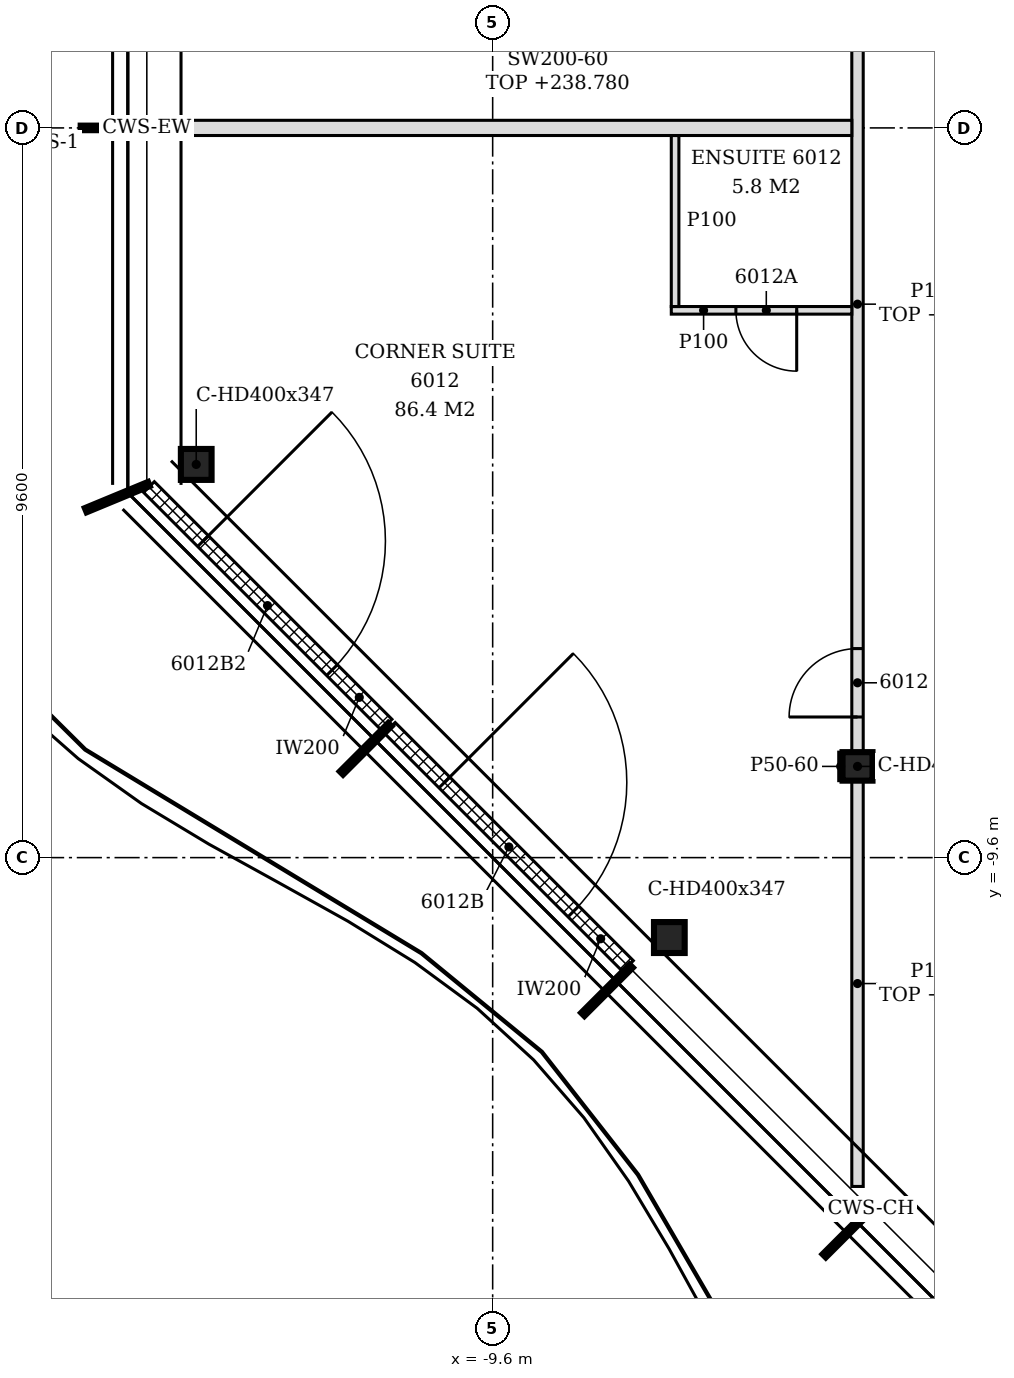
"""IFC4 building model, lengths in metres.
Left out: names, types, materials, properties, quantities, classifications, styles, units other than length and angle.
Written with IfcOpenShell. Run it as: python <this file> out.ifc"""

import sys

from ifc_helpers import new_model, si_unit, direction, frame, frame_2d, origin, origin_2d, place, context, subcontext, project, spatial, polyline, rectangle, i_section, outline, extrude, element, fill, save


model = new_model("IFC4")
c1 = context("Model", 3, precision=1e-05, world=origin(), true_north=direction((0.0, 1.0)))
c2 = subcontext(c1, "Body", "Model", "MODEL_VIEW")
j1 = project(units=[si_unit("LENGTHUNIT", "METRE"), si_unit("PLANEANGLEUNIT", "RADIAN")], contexts=[c1])
p1 = place(None, origin())
s1 = spatial("IfcSite", under=j1, at=p1, CompositionType="ELEMENT")
p2 = place(p1, origin())
s2 = spatial("IfcBuilding", under=s1, at=p2, CompositionType="ELEMENT")
p3 = place(p2, frame((0.0, 0.0, 235.8)))
s3 = spatial("IfcBuildingStorey", under=s2, at=p3, CompositionType="ELEMENT", Elevation=235.8)
for number, where, z_axis, x_axis in (
    (1, (-13.5, -4.427, -0.15), (0.0, 0.0, 1.0), (1.0, 0.0, 0.0)),
    (2, (-7.276, -10.652, -0.15), (0.0, 0.0, 1.0), (1.0, 0.0, 0.0)),
):
    element("IfcColumn", number, at=place(p3, frame(where, z_axis=z_axis, x_axis=x_axis)), inside=s3, PredefinedType="COLUMN", context=c2, shape_type="SweptSolid", body=[
        extrude(i_section(OverallWidth=0.404, OverallDepth=0.407, WebThickness=0.027, FlangeThickness=0.044, FilletRadius=0.015, at=origin_2d()), origin(), (0.0, 0.0, 1.0), 3.6),
    ])
p4 = place(p3, frame((-4.8, -8.4, -0.15), z_axis=(0.0, 0.0, 1.0), x_axis=(1.0, 0.0, 0.0)))
e3 = element("IfcColumn", 3, at=p4, inside=s3, PredefinedType="COLUMN", context=c2, shape_type="SweptSolid", body=[
    extrude(i_section(OverallWidth=0.394, OverallDepth=0.375, WebThickness=0.017, FlangeThickness=0.028, FilletRadius=0.015, at=origin_2d()), origin(), (0.0, 0.0, 1.0), 3.6),
])
p5 = place(p3, frame((-14.122, -4.725, 0.0), z_axis=(0.0, 0.0, 1.0), x_axis=(0.707106781187, -0.707106781187, 0.0)))
e4 = element("IfcWall", 4, at=p5, inside=s3, PredefinedType="NOTDEFINED", context=c2, shape_type="SweptSolid", body=[
    extrude(rectangle(XDim=4.421, YDim=0.2, at=frame_2d((2.21, 0.0))), origin(), (0.0, 0.0, 1.0), 3.45),
])
p6 = place(p5, frame((1.005, 0.0, 0.0)))
e5 = element("IfcOpeningElement", 5, at=p6, cuts=e4, PredefinedType="OPENING", context=c2, shape_type="SweptSolid", body=[
    extrude(rectangle(XDim=2.4, YDim=2.4, at=frame_2d((1.2, 1.2))), frame((0.0, 0.11, 0.0), z_axis=(0.0, -1.0, 0.0), x_axis=(1.0, 0.0, 0.0)), (0.0, 0.0, 1.0), 0.22),
])
p7 = place(p3, frame((-10.953, -7.893, 0.0), z_axis=(0.0, 0.0, 1.0), x_axis=(0.707106781187, -0.707106781187, 0.0)))
e6 = element("IfcWall", 6, at=p7, inside=s3, PredefinedType="NOTDEFINED", context=c2, shape_type="SweptSolid", body=[
    extrude(rectangle(XDim=4.431, YDim=0.2, at=frame_2d((2.215, 0.0))), origin(), (0.0, 0.0, 1.0), 3.45),
])
p8 = place(p7, frame((1.015, 0.0, 0.0)))
e7 = element("IfcOpeningElement", 7, at=p8, cuts=e6, PredefinedType="OPENING", context=c2, shape_type="SweptSolid", body=[
    extrude(rectangle(XDim=2.4, YDim=2.4, at=frame_2d((1.2, 1.2))), frame((0.0, 0.11, 0.0), z_axis=(0.0, -1.0, 0.0), x_axis=(1.0, 0.0, 0.0)), (0.0, 0.0, 1.0), 0.22),
])
p9 = place(p3, frame((-4.8, -13.926, 0.0), z_axis=(0.0, 0.0, 1.0), x_axis=(0.0, 1.0, 0.0)))
e8 = element("IfcWall", 8, at=p9, inside=s3, PredefinedType="PARTITIONING", context=c2, shape_type="SweptSolid", body=[
    extrude(outline(polyline([(0.0, 0.0), (5.339, 0.0), (5.339, 3.03), (1.369, 3.03), (1.367, 2.63), (0.229, 2.63), (0.227, 3.03), (0.0, 3.03), (0.0, 0.0)])), frame((0.0, 0.075, 0.0), z_axis=(0.0, -1.0, 0.0), x_axis=(1.0, 0.0, 0.0)), (0.0, 0.0, 1.0), 0.15),
])
p10 = place(p3, frame((-4.8, -8.212, 0.0), z_axis=(0.0, 0.0, 1.0), x_axis=(0.0, 1.0, 0.0)))
e9 = element("IfcWall", 9, at=p10, inside=s3, PredefinedType="PARTITIONING", context=c2, shape_type="SweptSolid", body=[
    extrude(rectangle(XDim=10.425, YDim=0.15, at=frame_2d((5.212, 0.0))), origin(), (0.0, 0.0, 1.0), 2.83),
])
p11 = place(p10, frame((0.462, 0.0, 0.0)))
e10 = element("IfcOpeningElement", 10, at=p11, cuts=e9, PredefinedType="OPENING", context=c2, shape_type="SweptSolid", body=[
    extrude(rectangle(XDim=0.9, YDim=2.1, at=frame_2d((0.45, 1.05))), frame((0.0, 0.085, 0.0), z_axis=(0.0, -1.0, 0.0), x_axis=(1.0, 0.0, 0.0)), (0.0, 0.0, 1.0), 0.17),
])
p12 = place(p3, frame((-7.25, -2.4, 0.0), z_axis=(0.0, 0.0, 1.0), x_axis=(1.0, 0.0, 0.0)))
e11 = element("IfcWall", 11, at=p12, inside=s3, PredefinedType="PARTITIONING", context=c2, shape_type="SweptSolid", body=[
    extrude(outline(polyline([(0.0, 0.0), (2.375, 0.0), (2.375, 2.83), (2.3, 2.83), (2.298, 3.45), (0.0, 3.45), (0.0, 0.0)])), frame((0.0, 0.05, 0.0), z_axis=(0.0, -1.0, 0.0), x_axis=(1.0, 0.0, 0.0)), (0.0, 0.0, 1.0), 0.1),
])
p13 = place(p12, frame((0.85, 0.0, 0.0)))
e12 = element("IfcOpeningElement", 12, at=p13, cuts=e11, PredefinedType="OPENING", context=c2, shape_type="SweptSolid", body=[
    extrude(rectangle(XDim=0.8, YDim=2.1, at=frame_2d((0.4, 1.05))), frame((0.0, 0.06, 0.0), z_axis=(0.0, -1.0, 0.0), x_axis=(1.0, 0.0, 0.0)), (0.0, 0.0, 1.0), 0.12),
])
p14 = place(p3, frame((-7.2, -2.35, 0.0), z_axis=(0.0, 0.0, 1.0), x_axis=(0.0, 1.0, 0.0)))
e13 = element("IfcWall", 13, at=p14, inside=s3, PredefinedType="PARTITIONING", context=c2, shape_type="SweptSolid", body=[
    extrude(rectangle(XDim=2.25, YDim=0.1, at=frame_2d((1.125, 0.0))), origin(), (0.0, 0.0, 1.0), 3.45),
])
p15 = place(p3, frame((-14.09, 0.0, 0.0), z_axis=(0.0, 0.0, 1.0), x_axis=(1.0, 0.0, 0.0)))
e14 = element("IfcWall", 14, at=p15, inside=s3, PredefinedType="PARTITIONING", context=c2, shape_type="SweptSolid", body=[
    extrude(outline(polyline([(0.0, 0.0), (9.215, 0.0), (9.215, 2.83), (9.14, 2.83), (9.138, 2.98), (0.74, 2.98), (0.738, 2.93), (0.44, 2.93), (0.438, 2.98), (0.0, 2.98), (0.0, 0.0)])), frame((0.0, 0.1, 0.0), z_axis=(0.0, -1.0, 0.0), x_axis=(1.0, 0.0, 0.0)), (0.0, 0.0, 1.0), 0.2),
])
p16 = place(p3, frame((-5.022, -8.587, 0.0), z_axis=(0.0, 0.0, 1.0), x_axis=(0.0, 1.0, 0.0)))
e15 = element("IfcWall", 15, at=p16, inside=s3, PredefinedType="PARTITIONING", context=c2, shape_type="SweptSolid", body=[
    extrude(rectangle(XDim=0.375, YDim=0.05, at=frame_2d((0.188, 0.0))), origin(), (0.0, 0.0, 1.0), 3.45),
])
p17 = place(p6, origin())
e16 = element("IfcDoor", 16, at=p17, inside=s3, OperationType="SINGLE_SWING_LEFT", PredefinedType="DOOR", context=c2, shape_type="SweptSolid", body=[
    extrude(rectangle(XDim=2.4, YDim=2.4, at=frame_2d((1.2, 1.2))), frame((0.0, 0.025, 0.0), z_axis=(0.0, -1.0, 0.0), x_axis=(1.0, 0.0, 0.0)), (0.0, 0.0, 1.0), 0.05),
])
fill(e5, e16)
p18 = place(p8, origin())
e17 = element("IfcDoor", 17, at=p18, inside=s3, OperationType="SINGLE_SWING_LEFT", PredefinedType="DOOR", context=c2, shape_type="SweptSolid", body=[
    extrude(rectangle(XDim=2.4, YDim=2.4, at=frame_2d((1.2, 1.2))), frame((0.0, 0.025, 0.0), z_axis=(0.0, -1.0, 0.0), x_axis=(1.0, 0.0, 0.0)), (0.0, 0.0, 1.0), 0.05),
])
fill(e7, e17)
p19 = place(p11, origin())
e18 = element("IfcDoor", 18, at=p19, inside=s3, OperationType="SINGLE_SWING_LEFT", PredefinedType="DOOR", context=c2, shape_type="SweptSolid", body=[
    extrude(rectangle(XDim=0.9, YDim=2.1, at=frame_2d((0.45, 1.05))), frame((0.0, 0.025, 0.0), z_axis=(0.0, -1.0, 0.0), x_axis=(1.0, 0.0, 0.0)), (0.0, 0.0, 1.0), 0.05),
])
fill(e10, e18)
p20 = place(p13, frame((0.8, 0.0, 0.0), z_axis=(0.0, 0.0, 1.0), x_axis=(-1.0, 0.0, 0.0)))
e19 = element("IfcDoor", 19, at=p20, inside=s3, OperationType="SINGLE_SWING_LEFT", PredefinedType="DOOR", context=c2, shape_type="SweptSolid", body=[
    extrude(rectangle(XDim=0.8, YDim=2.1, at=frame_2d((0.4, 1.05))), frame((0.0, 0.025, 0.0), z_axis=(0.0, -1.0, 0.0), x_axis=(1.0, 0.0, 0.0)), (0.0, 0.0, 1.0), 0.05),
])
fill(e12, e19)
save(model, sys.argv[1])
